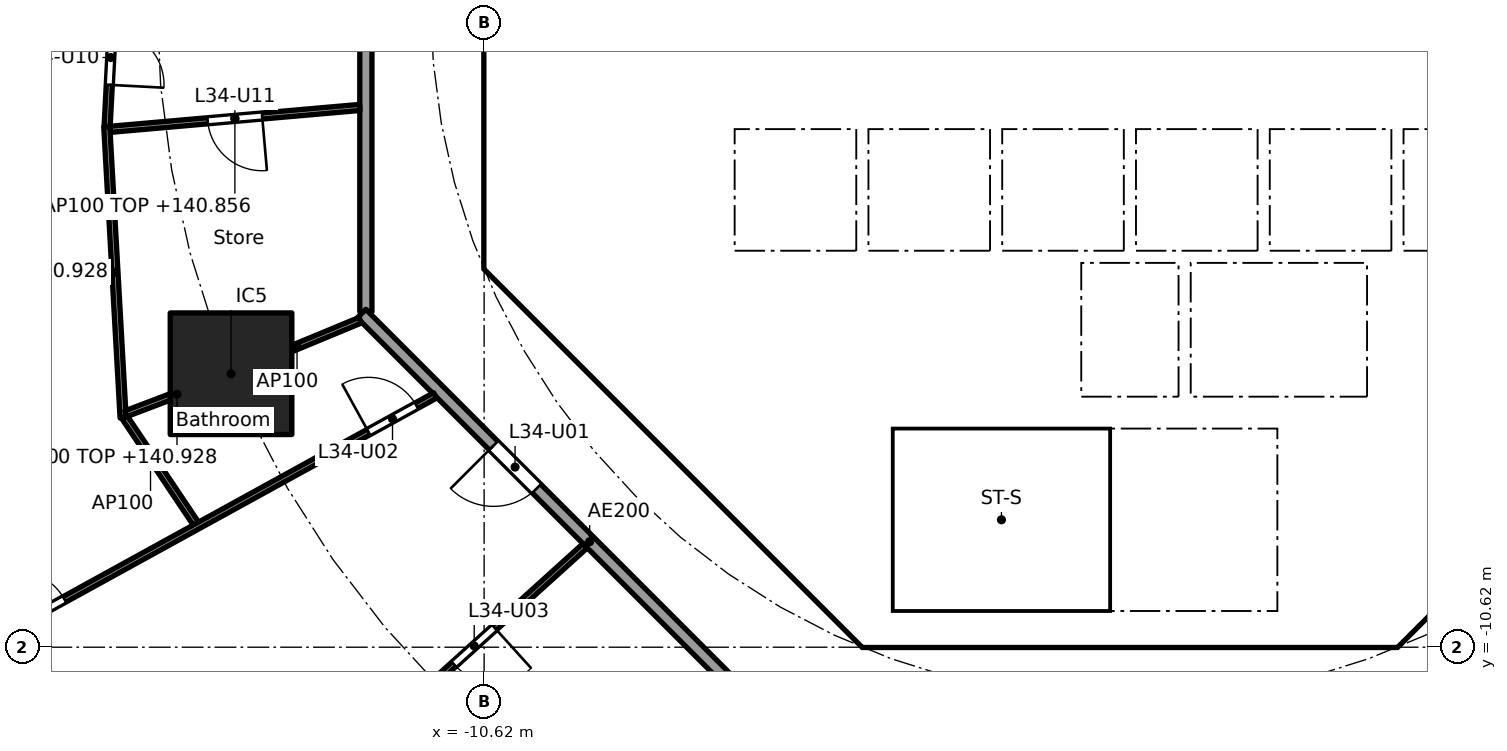
"""IFC4 building model, lengths in metres.
Left out: names, types, materials, properties, quantities, classifications, styles, units other than length and angle.
Written with IfcOpenShell. Run it as: python <this file> out.ifc"""

import sys

from ifc_helpers import new_model, si_unit, direction, frame, frame_2d, origin, origin_2d, place, context, subcontext, project, spatial, polyline, rectangle, outline, extrude, element, fill, save


model = new_model("IFC4")
c1 = context("Model", 3, precision=1e-05, world=origin(), true_north=direction((0.0, 1.0)))
c2 = subcontext(c1, "Body", "Model", "MODEL_VIEW")
j1 = project(units=[si_unit("LENGTHUNIT", "METRE"), si_unit("PLANEANGLEUNIT", "RADIAN")], contexts=[c1])
p1 = place(None, origin())
s1 = spatial("IfcSite", under=j1, at=p1, CompositionType="ELEMENT")
p2 = place(p1, origin())
s2 = spatial("IfcBuilding", under=s1, at=p2, CompositionType="ELEMENT")
p3 = place(p2, frame((0.0, 0.0, 138.1)))
s3 = spatial("IfcBuildingStorey", under=s2, at=p3, CompositionType="ELEMENT", Elevation=138.1)
p4 = place(p3, frame((-14.782, -6.123, 0.0), z_axis=(0.0, 0.0, 1.0), x_axis=(1.0, 0.0, 0.0)))
e1 = element("IfcColumn", 1, at=p4, inside=s3, PredefinedType="COLUMN", context=c2, shape_type="SweptSolid", body=[
    extrude(rectangle(XDim=2.0, YDim=2.0, at=origin_2d()), origin(), (0.0, 0.0, 1.0), 3.7),
])
p5 = place(p3, frame((-10.325, 3.801, 0.0), z_axis=(0.0, 0.0, 1.0), x_axis=(0.0, -1.0, 0.0)))
e2 = element("IfcWall", 2, at=p5, inside=s3, PredefinedType="SHEAR", context=c2, shape_type="SweptSolid", body=[
    extrude(rectangle(XDim=7.602, YDim=0.6, at=frame_2d((3.801, 0.0))), origin(), (0.0, 0.0, 1.0), 3.44),
])
p6 = place(p5, frame((0.651, 0.0, 0.0)))
e3 = element("IfcOpeningElement", 3, at=p6, cuts=e2, PredefinedType="OPENING", context=c2, shape_type="SweptSolid", body=[
    extrude(rectangle(XDim=1.5, YDim=2.1, at=frame_2d((0.75, 1.05))), frame((0.0, 0.31, 0.0), z_axis=(0.0, -1.0, 0.0), x_axis=(1.0, 0.0, 0.0)), (0.0, 0.0, 1.0), 0.62),
])
p7 = place(p5, frame((5.451, 0.0, 0.0)))
e4 = element("IfcOpeningElement", 4, at=p7, cuts=e2, PredefinedType="OPENING", context=c2, shape_type="SweptSolid", body=[
    extrude(rectangle(XDim=1.5, YDim=2.1, at=frame_2d((0.75, 1.05))), frame((0.0, 0.31, 0.0), z_axis=(0.0, -1.0, 0.0), x_axis=(1.0, 0.0, 0.0)), (0.0, 0.0, 1.0), 0.62),
])
p8 = place(p3, frame((-9.988, -4.613, 0.0), z_axis=(0.0, 0.0, 1.0), x_axis=(0.707106781187, -0.707106781187, 0.0)))
e5 = element("IfcWall", 5, at=p8, inside=s3, PredefinedType="SHEAR", context=c2, shape_type="SweptSolid", body=[
    extrude(rectangle(XDim=7.602, YDim=0.6, at=frame_2d((3.801, 0.0))), origin(), (0.0, 0.0, 1.0), 3.44),
])
p9 = place(p8, frame((6.151, 0.0, 0.0)))
e6 = element("IfcOpeningElement", 6, at=p9, cuts=e5, PredefinedType="OPENING", context=c2, shape_type="SweptSolid", body=[
    extrude(rectangle(XDim=1.1, YDim=2.1, at=frame_2d((0.55, 1.05))), frame((0.0, 0.31, 0.0), z_axis=(0.0, -1.0, 0.0), x_axis=(1.0, 0.0, 0.0)), (0.0, 0.0, 1.0), 0.62),
])
p10 = place(p3, frame((4.613, -9.988, 0.0), z_axis=(0.0, 0.0, 1.0), x_axis=(0.707106781187, 0.707106781187, 0.0)))
e7 = element("IfcWall", 7, at=p10, inside=s3, PredefinedType="SHEAR", context=c2, shape_type="SweptSolid", body=[
    extrude(rectangle(XDim=7.602, YDim=0.6, at=frame_2d((3.801, 0.0))), origin(), (0.0, 0.0, 1.0), 3.44),
])
p11 = place(p10, frame((3.201, 0.0, 0.0)))
e8 = element("IfcOpeningElement", 8, at=p11, cuts=e7, PredefinedType="OPENING", context=c2, shape_type="SweptSolid", body=[
    extrude(rectangle(XDim=1.2, YDim=2.1, at=frame_2d((0.6, 1.05))), frame((0.0, 0.31, 0.0), z_axis=(0.0, -1.0, 0.0), x_axis=(1.0, 0.0, 0.0)), (0.0, 0.0, 1.0), 0.62),
])
p12 = place(p3, frame((4.0, -10.025, 0.0), z_axis=(0.0, 0.0, 1.0), x_axis=(0.0, 1.0, 0.0)))
e9 = element("IfcWall", 9, at=p12, inside=s3, PredefinedType="SOLIDWALL", context=c2, shape_type="SweptSolid", body=[
    extrude(rectangle(XDim=3.0, YDim=0.2, at=frame_2d((1.5, 0.0))), origin(), (0.0, 0.0, 1.0), 3.44),
])
p13 = place(p12, frame((0.975, 0.0, 0.0)))
e10 = element("IfcOpeningElement", 10, at=p13, cuts=e9, PredefinedType="OPENING", context=c2, shape_type="SweptSolid", body=[
    extrude(rectangle(XDim=1.1, YDim=2.1, at=frame_2d((0.55, 1.05))), frame((0.0, 0.11, 0.0), z_axis=(0.0, -1.0, 0.0), x_axis=(1.0, 0.0, 0.0)), (0.0, 0.0, 1.0), 0.22),
])
p14 = place(p3, frame((-7.0, -7.027, 0.0), z_axis=(0.0, 0.0, 1.0), x_axis=(0.0, 1.0, 0.0)))
e11 = element("IfcWall", 11, at=p14, inside=s3, PredefinedType="PARTITIONING", context=c2, shape_type="SweptSolid", body=[
    extrude(rectangle(XDim=2.927, YDim=0.15, at=frame_2d((1.463, 0.0))), origin(), (0.0, 0.0, 1.0), 3.44),
])
p15 = place(p14, frame((0.976, 0.0, 0.0)))
e12 = element("IfcOpeningElement", 12, at=p15, cuts=e11, PredefinedType="OPENING", context=c2, shape_type="SweptSolid", body=[
    extrude(rectangle(XDim=0.9, YDim=2.1, at=frame_2d((0.45, 1.05))), frame((0.0, 0.085, 0.0), z_axis=(0.0, -1.0, 0.0), x_axis=(1.0, 0.0, 0.0)), (0.0, 0.0, 1.0), 0.17),
])
p16 = place(p3, frame((4.0, -6.5, 0.0), z_axis=(0.0, 0.0, 1.0), x_axis=(0.0, 1.0, 0.0)))
e13 = element("IfcWall", 13, at=p16, inside=s3, PredefinedType="SOLIDWALL", context=c2, shape_type="SweptSolid", body=[
    extrude(rectangle(XDim=2.2, YDim=0.2, at=frame_2d((1.1, 0.0))), origin(), (0.0, 0.0, 1.0), 3.44),
])
p17 = place(p16, frame((0.55, 0.0, 0.0)))
e14 = element("IfcOpeningElement", 14, at=p17, cuts=e13, PredefinedType="OPENING", context=c2, shape_type="SweptSolid", body=[
    extrude(rectangle(XDim=1.1, YDim=2.1, at=frame_2d((0.55, 1.05))), frame((0.0, 0.11, 0.0), z_axis=(0.0, -1.0, 0.0), x_axis=(1.0, 0.0, 0.0)), (0.0, 0.0, 1.0), 0.22),
])
p18 = place(p3, frame((-4.0, -6.5, 0.0), z_axis=(0.0, 0.0, 1.0), x_axis=(0.0, 1.0, 0.0)))
e15 = element("IfcWall", 15, at=p18, inside=s3, PredefinedType="SOLIDWALL", context=c2, shape_type="SweptSolid", body=[
    extrude(rectangle(XDim=2.2, YDim=0.2, at=frame_2d((1.1, 0.0))), origin(), (0.0, 0.0, 1.0), 3.44),
])
p19 = place(p18, frame((0.65, 0.0, 0.0)))
e16 = element("IfcOpeningElement", 16, at=p19, cuts=e15, PredefinedType="OPENING", context=c2, shape_type="SweptSolid", body=[
    extrude(rectangle(XDim=0.9, YDim=2.1, at=frame_2d((0.45, 1.05))), frame((0.0, 0.11, 0.0), z_axis=(0.0, -1.0, 0.0), x_axis=(1.0, 0.0, 0.0)), (0.0, 0.0, 1.0), 0.22),
])
p20 = place(p3, frame((-6.7, -2.0, 0.0), z_axis=(0.0, 0.0, 1.0), x_axis=(1.0, 0.0, 0.0)))
e17 = element("IfcWall", 17, at=p20, inside=s3, PredefinedType="SOLIDWALL", context=c2, shape_type="SweptSolid", body=[
    extrude(rectangle(XDim=13.4, YDim=0.2, at=frame_2d((6.7, 0.0))), origin(), (0.0, 0.0, 1.0), 3.44),
])
p21 = place(p20, frame((0.65, 0.0, 0.0)))
e18 = element("IfcOpeningElement", 18, at=p21, cuts=e17, PredefinedType="OPENING", context=c2, shape_type="SweptSolid", body=[
    extrude(rectangle(XDim=1.1, YDim=2.1, at=frame_2d((0.55, 1.05))), frame((0.0, 0.11, 0.0), z_axis=(0.0, -1.0, 0.0), x_axis=(1.0, 0.0, 0.0)), (0.0, 0.0, 1.0), 0.22),
])
p22 = place(p20, frame((2.85, 0.0, 0.0)))
e19 = element("IfcOpeningElement", 19, at=p22, cuts=e17, PredefinedType="OPENING", context=c2, shape_type="SweptSolid", body=[
    extrude(rectangle(XDim=1.1, YDim=2.1, at=frame_2d((0.55, 1.05))), frame((0.0, 0.11, 0.0), z_axis=(0.0, -1.0, 0.0), x_axis=(1.0, 0.0, 0.0)), (0.0, 0.0, 1.0), 0.22),
])
p23 = place(p3, origin())
e20 = element("IfcWall", 20, at=p23, inside=s3, PredefinedType="SHEAR", context=c2, shape_type="SweptSolid", body=[
    extrude(outline(polyline([(-10.625, -3.801), (-10.025, -3.801), (-10.025, -4.152), (-9.776, -4.401), (-10.2, -4.825), (-10.625, -4.401), (-10.625, -3.801)])), origin(), (0.0, 0.0, 1.0), 3.44),
])
p24 = place(p3, origin())
e21 = element("IfcWall", 21, at=p24, inside=s3, PredefinedType="SHEAR", context=c2, shape_type="SweptSolid", body=[
    extrude(outline(polyline([(-4.152, -10.025), (4.152, -10.025), (4.401, -9.776), (4.825, -10.2), (4.401, -10.625), (-4.401, -10.625), (-4.825, -10.2), (-4.401, -9.776), (-4.152, -10.025)])), origin(), (0.0, 0.0, 1.0), 3.44),
])
p25 = place(p3, frame((-10.025, -4.0, 0.0), z_axis=(0.0, 0.0, 1.0), x_axis=(1.0, 0.0, 0.0)))
e22 = element("IfcWall", 22, at=p25, inside=s3, PredefinedType="PARTITIONING", context=c2, shape_type="SweptSolid", body=[
    extrude(rectangle(XDim=3.325, YDim=0.2, at=frame_2d((1.662, 0.0))), origin(), (0.0, 0.0, 1.0), 3.44),
])
for number, where, z_axis, x_axis in (
    (23, (-0.9, -6.5, 0.0), (0.0, 0.0, 1.0), (0.0, 1.0, 0.0)),
    (24, (0.9, -6.5, 0.0), (0.0, 0.0, 1.0), (0.0, 1.0, 0.0)),
):
    element("IfcWall", number, at=place(p3, frame(where, z_axis=z_axis, x_axis=x_axis)), inside=s3, PredefinedType="SOLIDWALL", context=c2, shape_type="SweptSolid", body=[
        extrude(rectangle(XDim=2.2, YDim=0.2, at=frame_2d((1.1, 0.0))), origin(), (0.0, 0.0, 1.0), 3.44),
    ])
p26 = place(p3, origin())
e25 = element("IfcWall", 25, at=p26, inside=s3, PredefinedType="SOLIDWALL", context=c2, shape_type="SweptSolid", body=[
    extrude(outline(polyline([(-6.7, -2.1), (-6.5, -2.1), (-6.5, -4.1), (-4.5, -4.1), (-4.5, -2.1), (-4.3, -2.1), (-4.3, -4.1), (-2.3, -4.1), (-2.3, -2.1), (-2.1, -2.1), (-2.1, -4.1), (-0.1, -4.1), (-0.1, -2.1), (0.1, -2.1), (0.1, -4.1), (2.1, -4.1), (2.1, -2.1), (2.3, -2.1), (2.3, -4.1), (4.3, -4.1), (4.3, -2.1), (4.5, -2.1), (4.5, -4.1), (6.5, -4.1), (6.5, -2.1), (6.7, -2.1), (6.7, -4.3), (-6.7, -4.3), (-6.7, -2.1)])), origin(), (0.0, 0.0, 1.0), 3.44),
])
p27 = place(p3, origin())
e26 = element("IfcWall", 26, at=p27, inside=s3, PredefinedType="SOLIDWALL", context=c2, shape_type="SweptSolid", body=[
    extrude(outline(polyline([(-3.9, -10.025), (-4.1, -10.025), (-4.1, -7.025), (-3.9, -7.025), (-3.9, -10.025)])), origin(), (0.0, 0.0, 1.0), 3.44),
])
p28 = place(p3, origin())
e27 = element("IfcWall", 27, at=p28, inside=s3, PredefinedType="SOLIDWALL", context=c2, shape_type="SweptSolid", body=[
    extrude(outline(polyline([(4.1, -7.025), (-4.1, -7.025), (-4.1, -6.5), (4.1, -6.5), (4.1, -7.025)])), origin(), (0.0, 0.0, 1.0), 3.44),
])
p29 = place(p3, frame((-12.565, 5.304, 0.0), z_axis=(0.0, 0.0, 1.0), x_axis=(0.0, -1.0, 0.0)))
e28 = element("IfcWall", 28, at=p29, inside=s3, PredefinedType="PARTITIONING", context=c2, shape_type="SweptSolid", body=[
    extrude(rectangle(XDim=10.409, YDim=0.2, at=frame_2d((5.205, 0.0))), origin(), (0.0, 0.0, 1.0), 3.44),
])
p30 = place(p3, frame((-12.635, -5.134, 0.0), z_axis=(0.0, 0.0, 1.0), x_axis=(0.707106781187, -0.707106781187, 0.0)))
e29 = element("IfcWall", 29, at=p30, inside=s3, PredefinedType="PARTITIONING", context=c2, shape_type="SweptSolid", body=[
    extrude(rectangle(XDim=10.609, YDim=0.2, at=frame_2d((5.305, 0.0))), origin(), (0.0, 0.0, 1.0), 3.44),
])
p31 = place(p30, frame((3.07, 0.0, 0.0)))
e30 = element("IfcOpeningElement", 30, at=p31, cuts=e29, PredefinedType="OPENING", context=c2, shape_type="SweptSolid", body=[
    extrude(rectangle(XDim=1.0, YDim=2.1, at=frame_2d((0.5, 1.05))), frame((0.0, 0.11, 0.0), z_axis=(0.0, -1.0, 0.0), x_axis=(1.0, 0.0, 0.0)), (0.0, 0.0, 1.0), 0.22),
])
p32 = place(p3, frame((-16.576, 2.585, 0.0), z_axis=(0.0, 0.0, 1.0), x_axis=(-0.052509224895, -0.998620439056, 0.0)))
e31 = element("IfcWall", 31, at=p32, inside=s3, PredefinedType="PARTITIONING", context=c2, shape_type="SweptSolid", body=[
    extrude(rectangle(XDim=4.649, YDim=0.1, at=frame_2d((2.325, 0.0))), origin(), (0.0, 0.0, 1.0), 2.828),
])
p33 = place(p32, frame((3.062, 0.0, 0.0)))
e32 = element("IfcOpeningElement", 32, at=p33, cuts=e31, PredefinedType="OPENING", context=c2, shape_type="SweptSolid", body=[
    extrude(rectangle(XDim=0.9, YDim=2.1, at=frame_2d((0.45, 1.05))), frame((0.0, 0.06, 0.0), z_axis=(0.0, -1.0, 0.0), x_axis=(1.0, 0.0, 0.0)), (0.0, 0.0, 1.0), 0.12),
])
p34 = place(p3, frame((-12.664, -1.744, 0.0), z_axis=(0.0, 0.0, 1.0), x_axis=(-0.996181049379, -0.08731160781, 0.0)))
e33 = element("IfcWall", 33, at=p34, inside=s3, PredefinedType="PARTITIONING", context=c2, shape_type="SweptSolid", body=[
    extrude(rectangle(XDim=4.125, YDim=0.1, at=frame_2d((2.062, 0.0))), origin(), (0.0, 0.0, 1.0), 2.756),
])
p35 = place(p34, frame((1.612, 0.0, 0.0)))
e34 = element("IfcOpeningElement", 34, at=p35, cuts=e33, PredefinedType="OPENING", context=c2, shape_type="SweptSolid", body=[
    extrude(rectangle(XDim=0.9, YDim=2.1, at=frame_2d((0.45, 1.05))), frame((0.0, 0.06, 0.0), z_axis=(0.0, -1.0, 0.0), x_axis=(1.0, 0.0, 0.0)), (0.0, 0.0, 1.0), 0.12),
])
p36 = place(p3, frame((-16.825, -2.058, 0.0), z_axis=(0.0, 0.0, 1.0), x_axis=(0.055971643802, -0.998432358796, 0.0)))
e35 = element("IfcWall", 35, at=p36, inside=s3, PredefinedType="PARTITIONING", context=c2, shape_type="SweptSolid", body=[
    extrude(rectangle(XDim=4.798, YDim=0.1, at=frame_2d((2.399, 0.0))), origin(), (0.0, 0.0, 1.0), 2.828),
])
p37 = place(p3, frame((-12.657, -5.243, 0.0), z_axis=(0.0, 0.0, 1.0), x_axis=(-0.923864733477, -0.382719158442, 0.0)))
e36 = element("IfcWall", 36, at=p37, inside=s3, PredefinedType="PARTITIONING", context=c2, shape_type="SweptSolid", body=[
    extrude(rectangle(XDim=2.25, YDim=0.1, at=frame_2d((1.125, 0.0))), origin(), (0.0, 0.0, 1.0), 3.44),
])
p38 = place(p3, frame((-14.829, -6.141, 0.0), z_axis=(0.0, 0.0, 1.0), x_axis=(-0.934704367514, -0.355426146128, 0.0)))
e37 = element("IfcWall", 37, at=p38, inside=s3, PredefinedType="PARTITIONING", context=c2, shape_type="SweptSolid", body=[
    extrude(rectangle(XDim=1.802, YDim=0.1, at=frame_2d((0.901, 0.0))), origin(), (0.0, 0.0, 1.0), 2.828),
])
p39 = place(p3, frame((-16.532, -6.84, 0.0), z_axis=(0.0, 0.0, 1.0), x_axis=(0.556994773624, -0.830515997531, 0.0)))
e38 = element("IfcWall", 38, at=p39, inside=s3, PredefinedType="PARTITIONING", context=c2, shape_type="SweptSolid", body=[
    extrude(rectangle(XDim=2.183, YDim=0.1, at=frame_2d((1.092, 0.0))), origin(), (0.0, 0.0, 1.0), 3.44),
])
p40 = place(p3, frame((-11.426, -6.479, 0.0), z_axis=(0.0, 0.0, 1.0), x_axis=(-0.876110392495, -0.482110547657, 0.0)))
e39 = element("IfcWall", 39, at=p40, inside=s3, PredefinedType="PARTITIONING", context=c2, shape_type="SweptSolid", body=[
    extrude(rectangle(XDim=16.955, YDim=0.1, at=frame_2d((8.478, 0.0))), origin(), (0.0, 0.0, 1.0), 2.756),
])
p41 = place(p40, frame((0.35, 0.0, 0.0)))
e40 = element("IfcOpeningElement", 40, at=p41, cuts=e39, PredefinedType="OPENING", context=c2, shape_type="SweptSolid", body=[
    extrude(rectangle(XDim=0.9, YDim=2.1, at=frame_2d((0.45, 1.05))), frame((0.0, 0.06, 0.0), z_axis=(0.0, -1.0, 0.0), x_axis=(1.0, 0.0, 0.0)), (0.0, 0.0, 1.0), 0.12),
])
p42 = place(p40, frame((6.957, 0.0, 0.0)))
e41 = element("IfcOpeningElement", 41, at=p42, cuts=e39, PredefinedType="OPENING", context=c2, shape_type="SweptSolid", body=[
    extrude(rectangle(XDim=0.9, YDim=2.1, at=frame_2d((0.45, 1.05))), frame((0.0, 0.06, 0.0), z_axis=(0.0, -1.0, 0.0), x_axis=(1.0, 0.0, 0.0)), (0.0, 0.0, 1.0), 0.12),
])
p43 = place(p3, frame((-8.959, -8.952, 0.0), z_axis=(0.0, 0.0, 1.0), x_axis=(-0.741982736283, -0.670418987692, 0.0)))
e42 = element("IfcWall", 42, at=p43, inside=s3, PredefinedType="PARTITIONING", context=c2, shape_type="SweptSolid", body=[
    extrude(rectangle(XDim=11.371, YDim=0.1, at=frame_2d((5.685, 0.0))), origin(), (0.0, 0.0, 1.0), 2.756),
])
p44 = place(p43, frame((2.009, 0.0, 0.0)))
e43 = element("IfcOpeningElement", 43, at=p44, cuts=e42, PredefinedType="OPENING", context=c2, shape_type="SweptSolid", body=[
    extrude(rectangle(XDim=0.9, YDim=2.1, at=frame_2d((0.45, 1.05))), frame((0.0, 0.06, 0.0), z_axis=(0.0, -1.0, 0.0), x_axis=(1.0, 0.0, 0.0)), (0.0, 0.0, 1.0), 0.12),
])
p45 = place(p43, frame((7.694, 0.0, 0.0)))
e44 = element("IfcOpeningElement", 44, at=p45, cuts=e42, PredefinedType="OPENING", context=c2, shape_type="SweptSolid", body=[
    extrude(rectangle(XDim=0.9, YDim=2.1, at=frame_2d((0.45, 1.05))), frame((0.0, 0.06, 0.0), z_axis=(0.0, -1.0, 0.0), x_axis=(1.0, 0.0, 0.0)), (0.0, 0.0, 1.0), 0.12),
])
p46 = place(p21, origin())
e45 = element("IfcDoor", 45, at=p46, inside=s3, OperationType="DOUBLE_DOOR_SLIDING", PredefinedType="DOOR", context=c2, shape_type="SweptSolid", body=[
    extrude(rectangle(XDim=1.1, YDim=2.1, at=frame_2d((0.55, 1.05))), frame((0.0, 0.025, 0.0), z_axis=(0.0, -1.0, 0.0), x_axis=(1.0, 0.0, 0.0)), (0.0, 0.0, 1.0), 0.05),
])
fill(e18, e45)
p47 = place(p22, origin())
e46 = element("IfcDoor", 46, at=p47, inside=s3, OperationType="DOUBLE_DOOR_SLIDING", PredefinedType="DOOR", context=c2, shape_type="SweptSolid", body=[
    extrude(rectangle(XDim=1.1, YDim=2.1, at=frame_2d((0.55, 1.05))), frame((0.0, 0.025, 0.0), z_axis=(0.0, -1.0, 0.0), x_axis=(1.0, 0.0, 0.0)), (0.0, 0.0, 1.0), 0.05),
])
fill(e19, e46)
p48 = place(p17, origin())
e47 = element("IfcDoor", 47, at=p48, inside=s3, OperationType="DOUBLE_DOOR_SLIDING", PredefinedType="DOOR", context=c2, shape_type="SweptSolid", body=[
    extrude(rectangle(XDim=1.1, YDim=2.1, at=frame_2d((0.55, 1.05))), frame((0.0, 0.025, 0.0), z_axis=(0.0, -1.0, 0.0), x_axis=(1.0, 0.0, 0.0)), (0.0, 0.0, 1.0), 0.05),
])
fill(e14, e47)
p49 = place(p13, origin())
e48 = element("IfcDoor", 48, at=p49, inside=s3, OperationType="SINGLE_SWING_LEFT", PredefinedType="DOOR", context=c2, shape_type="SweptSolid", body=[
    extrude(rectangle(XDim=1.1, YDim=2.1, at=frame_2d((0.55, 1.05))), frame((0.0, 0.025, 0.0), z_axis=(0.0, -1.0, 0.0), x_axis=(1.0, 0.0, 0.0)), (0.0, 0.0, 1.0), 0.05),
])
fill(e10, e48)
p50 = place(p15, origin())
e49 = element("IfcDoor", 49, at=p50, inside=s3, OperationType="SINGLE_SWING_LEFT", PredefinedType="DOOR", context=c2, shape_type="SweptSolid", body=[
    extrude(rectangle(XDim=0.9, YDim=2.1, at=frame_2d((0.45, 1.05))), frame((0.0, 0.025, 0.0), z_axis=(0.0, -1.0, 0.0), x_axis=(1.0, 0.0, 0.0)), (0.0, 0.0, 1.0), 0.05),
])
fill(e12, e49)
p51 = place(p19, frame((0.9, 0.0, 0.0), x_axis=(-1.0, 0.0, 0.0)))
e50 = element("IfcDoor", 50, at=p51, inside=s3, OperationType="SINGLE_SWING_LEFT", PredefinedType="DOOR", context=c2, shape_type="SweptSolid", body=[
    extrude(rectangle(XDim=0.9, YDim=2.1, at=frame_2d((0.45, 1.05))), frame((0.0, 0.025, 0.0), z_axis=(0.0, -1.0, 0.0), x_axis=(1.0, 0.0, 0.0)), (0.0, 0.0, 1.0), 0.05),
])
fill(e16, e50)
p52 = place(p7, origin())
e51 = element("IfcDoor", 51, at=p52, inside=s3, OperationType="DOUBLE_DOOR_SINGLE_SWING", PredefinedType="DOOR", context=c2, shape_type="SweptSolid", body=[
    extrude(rectangle(XDim=1.5, YDim=2.1, at=frame_2d((0.75, 1.05))), frame((0.0, 0.025, 0.0), z_axis=(0.0, -1.0, 0.0), x_axis=(1.0, 0.0, 0.0)), (0.0, 0.0, 1.0), 0.05),
])
fill(e4, e51)
p53 = place(p9, origin())
e52 = element("IfcDoor", 52, at=p53, inside=s3, OperationType="SINGLE_SWING_RIGHT", PredefinedType="DOOR", context=c2, shape_type="SweptSolid", body=[
    extrude(rectangle(XDim=1.1, YDim=2.1, at=frame_2d((0.55, 1.05))), frame((0.0, 0.025, 0.0), z_axis=(0.0, -1.0, 0.0), x_axis=(1.0, 0.0, 0.0)), (0.0, 0.0, 1.0), 0.05),
])
fill(e6, e52)
p54 = place(p31, frame((1.0, 0.0, 0.0), x_axis=(-1.0, 0.0, 0.0)))
e53 = element("IfcDoor", 53, at=p54, inside=s3, OperationType="SINGLE_SWING_RIGHT", PredefinedType="DOOR", context=c2, shape_type="SweptSolid", body=[
    extrude(rectangle(XDim=1.0, YDim=2.1, at=frame_2d((0.5, 1.05))), frame((0.0, 0.025, 0.0), z_axis=(0.0, -1.0, 0.0), x_axis=(1.0, 0.0, 0.0)), (0.0, 0.0, 1.0), 0.05),
])
fill(e30, e53)
p55 = place(p41, frame((0.9, 0.0, 0.0), x_axis=(-1.0, 0.0, 0.0)))
e54 = element("IfcDoor", 54, at=p55, inside=s3, OperationType="SINGLE_SWING_LEFT", PredefinedType="DOOR", context=c2, shape_type="SweptSolid", body=[
    extrude(rectangle(XDim=0.9, YDim=2.1, at=frame_2d((0.45, 1.05))), frame((0.0, 0.025, 0.0), z_axis=(0.0, -1.0, 0.0), x_axis=(1.0, 0.0, 0.0)), (0.0, 0.0, 1.0), 0.05),
])
fill(e40, e54)
p56 = place(p44, origin())
e55 = element("IfcDoor", 55, at=p56, inside=s3, OperationType="SINGLE_SWING_LEFT", PredefinedType="DOOR", context=c2, shape_type="SweptSolid", body=[
    extrude(rectangle(XDim=0.9, YDim=2.1, at=frame_2d((0.45, 1.05))), frame((0.0, 0.025, 0.0), z_axis=(0.0, -1.0, 0.0), x_axis=(1.0, 0.0, 0.0)), (0.0, 0.0, 1.0), 0.05),
])
fill(e43, e55)
p57 = place(p42, frame((0.9, 0.0, 0.0), x_axis=(-1.0, 0.0, 0.0)))
e56 = element("IfcDoor", 56, at=p57, inside=s3, OperationType="SINGLE_SWING_LEFT", PredefinedType="DOOR", context=c2, shape_type="SweptSolid", body=[
    extrude(rectangle(XDim=0.9, YDim=2.1, at=frame_2d((0.45, 1.05))), frame((0.0, 0.025, 0.0), z_axis=(0.0, -1.0, 0.0), x_axis=(1.0, 0.0, 0.0)), (0.0, 0.0, 1.0), 0.05),
])
fill(e41, e56)
p58 = place(p33, origin())
e57 = element("IfcDoor", 57, at=p58, inside=s3, OperationType="SINGLE_SWING_RIGHT", PredefinedType="DOOR", context=c2, shape_type="SweptSolid", body=[
    extrude(rectangle(XDim=0.9, YDim=2.1, at=frame_2d((0.45, 1.05))), frame((0.0, 0.025, 0.0), z_axis=(0.0, -1.0, 0.0), x_axis=(1.0, 0.0, 0.0)), (0.0, 0.0, 1.0), 0.05),
])
fill(e32, e57)
p59 = place(p35, origin())
e58 = element("IfcDoor", 58, at=p59, inside=s3, OperationType="SINGLE_SWING_LEFT", PredefinedType="DOOR", context=c2, shape_type="SweptSolid", body=[
    extrude(rectangle(XDim=0.9, YDim=2.1, at=frame_2d((0.45, 1.05))), frame((0.0, 0.025, 0.0), z_axis=(0.0, -1.0, 0.0), x_axis=(1.0, 0.0, 0.0)), (0.0, 0.0, 1.0), 0.05),
])
fill(e34, e58)
save(model, sys.argv[1])
